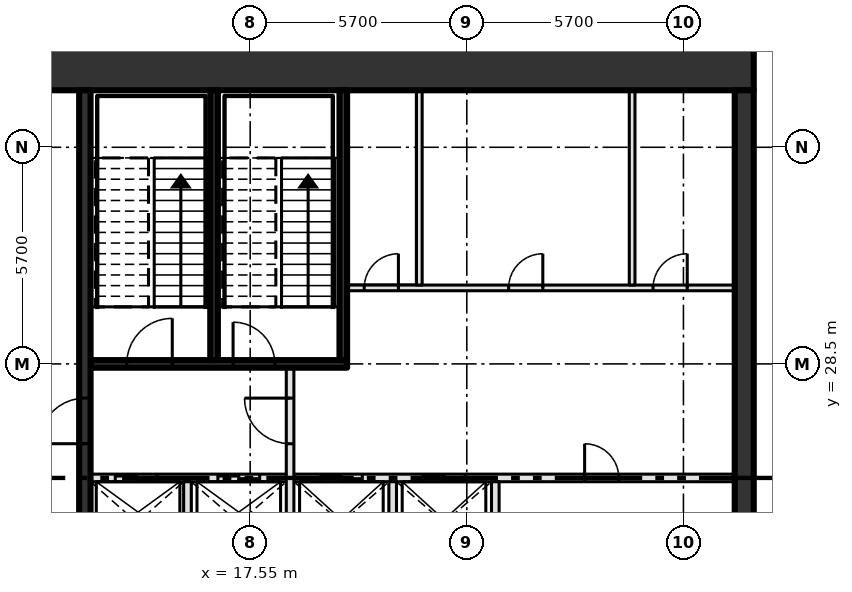
"""IFC4 building model, lengths in metres.
Left out: names, types, materials, properties, quantities, classifications, styles, units other than length and angle.
Written with IfcOpenShell. Run it as: python <this file> out.ifc"""

import sys

from ifc_helpers import new_model, si_unit, direction, frame, frame_2d, origin, place, context, subcontext, project, spatial, rectangle, extrude, element, fill, save


model = new_model("IFC4")
c1 = context("Model", 3, precision=1e-05, world=origin(), true_north=direction((0.0, 1.0)))
c2 = subcontext(c1, "Body", "Model", "MODEL_VIEW")
j1 = project(units=[si_unit("LENGTHUNIT", "METRE"), si_unit("PLANEANGLEUNIT", "RADIAN")], contexts=[c1])
p1 = place(None, origin())
s1 = spatial("IfcSite", under=j1, at=p1, CompositionType="ELEMENT")
p2 = place(p1, origin())
s2 = spatial("IfcBuilding", under=s1, at=p2, CompositionType="ELEMENT")
p3 = place(p2, frame((0.0, 0.0, 348.6)))
s3 = spatial("IfcBuildingStorey", under=s2, at=p3, CompositionType="ELEMENT", Elevation=348.6)
p4 = place(p3, frame((8.0, 36.3, -0.45), z_axis=(0.0, 0.0, 1.0), x_axis=(1.0, 0.0, 0.0)))
e1 = element("IfcWall", 1, at=p4, inside=s3, PredefinedType="SHEAR", context=c2, shape_type="SweptSolid", body=[
    extrude(rectangle(XDim=22.8, YDim=1.2, at=frame_2d((11.4, 0.0))), origin(), (0.0, 0.0, 1.0), 5.55),
])
p5 = place(p4, frame((2.3, 0.0, 0.45)))
e2 = element("IfcOpeningElement", 2, at=p5, cuts=e1, PredefinedType="OPENING", context=c2, shape_type="SweptSolid", body=[
    extrude(rectangle(XDim=1.8, YDim=2.1, at=frame_2d((0.9, 1.05))), frame((0.0, 0.61, 0.0), z_axis=(0.0, -1.0, 0.0), x_axis=(1.0, 0.0, 0.0)), (0.0, 0.0, 1.0), 1.22),
])
p6 = place(p3, frame((30.55, 14.6, -0.45), z_axis=(0.0, 0.0, 1.0), x_axis=(0.0, 1.0, 0.0)))
e3 = element("IfcWall", 3, at=p6, inside=s3, PredefinedType="SHEAR", context=c2, shape_type="SweptSolid", body=[
    extrude(rectangle(XDim=21.1, YDim=0.5, at=frame_2d((10.55, 0.0))), origin(), (0.0, 0.0, 1.0), 5.55),
])
p7 = place(p3, frame((13.35, 25.5, 0.0), z_axis=(0.0, 0.0, 1.0), x_axis=(1.0, 0.0, 0.0)))
e4 = element("IfcWall", 4, at=p7, inside=s3, PredefinedType="SOLIDWALL", context=c2, shape_type="SweptSolid", body=[
    extrude(rectangle(XDim=16.95, YDim=0.2, at=frame_2d((8.475, 0.0))), origin(), (0.0, 0.0, 1.0), 5.1),
])
p8 = place(p7, frame((0.65, 0.0, 0.0)))
e5 = element("IfcOpeningElement", 5, at=p8, cuts=e4, PredefinedType="OPENING", context=c2, shape_type="SweptSolid", body=[
    extrude(rectangle(XDim=1.1, YDim=2.1, at=frame_2d((0.55, 1.05))), frame((0.0, 0.11, 0.0), z_axis=(0.0, -1.0, 0.0), x_axis=(1.0, 0.0, 0.0)), (0.0, 0.0, 1.0), 0.22),
])
p9 = place(p7, frame((3.35, 0.0, 0.0)))
e6 = element("IfcOpeningElement", 6, at=p9, cuts=e4, PredefinedType="OPENING", context=c2, shape_type="SweptSolid", body=[
    extrude(rectangle(XDim=1.1, YDim=2.1, at=frame_2d((0.55, 1.05))), frame((0.0, 0.11, 0.0), z_axis=(0.0, -1.0, 0.0), x_axis=(1.0, 0.0, 0.0)), (0.0, 0.0, 1.0), 0.22),
])
p10 = place(p7, frame((6.05, 0.0, 0.0)))
e7 = element("IfcOpeningElement", 7, at=p10, cuts=e4, PredefinedType="OPENING", context=c2, shape_type="SweptSolid", body=[
    extrude(rectangle(XDim=1.1, YDim=2.1, at=frame_2d((0.55, 1.05))), frame((0.0, 0.11, 0.0), z_axis=(0.0, -1.0, 0.0), x_axis=(1.0, 0.0, 0.0)), (0.0, 0.0, 1.0), 0.22),
])
p11 = place(p7, frame((8.75, 0.0, 0.0)))
e8 = element("IfcOpeningElement", 8, at=p11, cuts=e4, PredefinedType="OPENING", context=c2, shape_type="SweptSolid", body=[
    extrude(rectangle(XDim=1.1, YDim=2.1, at=frame_2d((0.55, 1.05))), frame((0.0, 0.11, 0.0), z_axis=(0.0, -1.0, 0.0), x_axis=(1.0, 0.0, 0.0)), (0.0, 0.0, 1.0), 0.22),
])
p12 = place(p7, frame((13.0, 0.0, 0.0)))
e9 = element("IfcOpeningElement", 9, at=p12, cuts=e4, PredefinedType="OPENING", context=c2, shape_type="SweptSolid", body=[
    extrude(rectangle(XDim=0.9, YDim=2.1, at=frame_2d((0.45, 1.05))), frame((0.0, 0.11, 0.0), z_axis=(0.0, -1.0, 0.0), x_axis=(1.0, 0.0, 0.0)), (0.0, 0.0, 1.0), 0.22),
])
p13 = place(p3, frame((13.35, 28.5, 0.0), z_axis=(0.0, 0.0, 1.0), x_axis=(1.0, 0.0, 0.0)))
e10 = element("IfcWall", 10, at=p13, inside=s3, PredefinedType="SOLIDWALL", context=c2, shape_type="SweptSolid", body=[
    extrude(rectangle(XDim=6.75, YDim=0.2, at=frame_2d((3.375, 0.0))), origin(), (0.0, 0.0, 1.0), 5.1),
])
p14 = place(p13, frame((0.95, 0.0, 0.0)))
e11 = element("IfcOpeningElement", 11, at=p14, cuts=e10, PredefinedType="OPENING", context=c2, shape_type="SweptSolid", body=[
    extrude(rectangle(XDim=1.2, YDim=2.1, at=frame_2d((0.6, 1.05))), frame((0.0, 0.11, 0.0), z_axis=(0.0, -1.0, 0.0), x_axis=(1.0, 0.0, 0.0)), (0.0, 0.0, 1.0), 0.22),
])
p15 = place(p13, frame((3.75, 0.0, 0.0)))
e12 = element("IfcOpeningElement", 12, at=p15, cuts=e10, PredefinedType="OPENING", context=c2, shape_type="SweptSolid", body=[
    extrude(rectangle(XDim=1.1, YDim=2.1, at=frame_2d((0.55, 1.05))), frame((0.0, 0.11, 0.0), z_axis=(0.0, -1.0, 0.0), x_axis=(1.0, 0.0, 0.0)), (0.0, 0.0, 1.0), 0.22),
])
p16 = place(p3, frame((20.1, 30.5, 0.0), z_axis=(0.0, 0.0, 1.0), x_axis=(1.0, 0.0, 0.0)))
e13 = element("IfcWall", 13, at=p16, inside=s3, PredefinedType="PARTITIONING", context=c2, shape_type="SweptSolid", body=[
    extrude(rectangle(XDim=10.2, YDim=0.15, at=frame_2d((5.1, 0.0))), origin(), (0.0, 0.0, 1.0), 5.1),
])
p17 = place(p16, frame((0.45, 0.0, 0.0)))
e14 = element("IfcOpeningElement", 14, at=p17, cuts=e13, PredefinedType="OPENING", context=c2, shape_type="SweptSolid", body=[
    extrude(rectangle(XDim=0.9, YDim=2.1, at=frame_2d((0.45, 1.05))), frame((0.0, 0.085, 0.0), z_axis=(0.0, -1.0, 0.0), x_axis=(1.0, 0.0, 0.0)), (0.0, 0.0, 1.0), 0.17),
])
p18 = place(p16, frame((4.25, 0.0, 0.0)))
e15 = element("IfcOpeningElement", 15, at=p18, cuts=e13, PredefinedType="OPENING", context=c2, shape_type="SweptSolid", body=[
    extrude(rectangle(XDim=0.9, YDim=2.1, at=frame_2d((0.45, 1.05))), frame((0.0, 0.085, 0.0), z_axis=(0.0, -1.0, 0.0), x_axis=(1.0, 0.0, 0.0)), (0.0, 0.0, 1.0), 0.17),
])
p19 = place(p16, frame((8.05, 0.0, 0.0)))
e16 = element("IfcOpeningElement", 16, at=p19, cuts=e13, PredefinedType="OPENING", context=c2, shape_type="SweptSolid", body=[
    extrude(rectangle(XDim=0.9, YDim=2.1, at=frame_2d((0.45, 1.05))), frame((0.0, 0.085, 0.0), z_axis=(0.0, -1.0, 0.0), x_axis=(1.0, 0.0, 0.0)), (0.0, 0.0, 1.0), 0.17),
])
p20 = place(p3, frame((13.2, 14.6, 0.0), z_axis=(0.0, 0.0, 1.0), x_axis=(0.0, 1.0, 0.0)))
e17 = element("IfcWall", 17, at=p20, inside=s3, PredefinedType="SHEAR", context=c2, shape_type="SweptSolid", body=[
    extrude(rectangle(XDim=21.1, YDim=0.3, at=frame_2d((10.55, 0.0))), origin(), (0.0, 0.0, 1.0), 5.1),
])
p21 = place(p20, frame((3.7, 0.0, 0.0)))
e18 = element("IfcOpeningElement", 18, at=p21, cuts=e17, PredefinedType="OPENING", context=c2, shape_type="SweptSolid", body=[
    extrude(rectangle(XDim=1.8, YDim=2.1, at=frame_2d((0.9, 1.05))), frame((0.0, 0.16, 0.0), z_axis=(0.0, -1.0, 0.0), x_axis=(1.0, 0.0, 0.0)), (0.0, 0.0, 1.0), 0.32),
])
p22 = place(p20, frame((11.8, 0.0, 0.0)))
e19 = element("IfcOpeningElement", 19, at=p22, cuts=e17, PredefinedType="OPENING", context=c2, shape_type="SweptSolid", body=[
    extrude(rectangle(XDim=1.2, YDim=2.1, at=frame_2d((0.6, 1.05))), frame((0.0, 0.16, 0.0), z_axis=(0.0, -1.0, 0.0), x_axis=(1.0, 0.0, 0.0)), (0.0, 0.0, 1.0), 0.32),
])
p23 = place(p3, frame((15.9, 23.25, 0.0), z_axis=(0.0, 0.0, 1.0), x_axis=(0.0, 1.0, 0.0)))
e20 = element("IfcWall", 20, at=p23, inside=s3, PredefinedType="SOLIDWALL", context=c2, shape_type="SweptSolid", body=[
    extrude(rectangle(XDim=2.15, YDim=0.2, at=frame_2d((1.075, 0.0))), origin(), (0.0, 0.0, 1.0), 5.1),
])
p24 = place(p3, frame((16.6, 28.6, 0.0), z_axis=(0.0, 0.0, 1.0), x_axis=(0.0, 1.0, 0.0)))
e21 = element("IfcWall", 21, at=p24, inside=s3, PredefinedType="SOLIDWALL", context=c2, shape_type="SweptSolid", body=[
    extrude(rectangle(XDim=7.1, YDim=0.2, at=frame_2d((3.55, 0.0))), origin(), (0.0, 0.0, 1.0), 5.1),
])
p25 = place(p3, frame((18.6, 20.775, 0.0), z_axis=(0.0, 0.0, 1.0), x_axis=(0.0, 1.0, 0.0)))
e22 = element("IfcWall", 22, at=p25, inside=s3, PredefinedType="SOLIDWALL", context=c2, shape_type="SweptSolid", body=[
    extrude(rectangle(XDim=7.625, YDim=0.2, at=frame_2d((3.812, 0.0))), origin(), (0.0, 0.0, 1.0), 5.1),
])
p26 = place(p25, frame((5.625, 0.0, 0.0)))
e23 = element("IfcOpeningElement", 23, at=p26, cuts=e22, PredefinedType="OPENING", context=c2, shape_type="SweptSolid", body=[
    extrude(rectangle(XDim=1.2, YDim=2.1, at=frame_2d((0.6, 1.05))), frame((0.0, 0.11, 0.0), z_axis=(0.0, -1.0, 0.0), x_axis=(1.0, 0.0, 0.0)), (0.0, 0.0, 1.0), 0.22),
])
p27 = place(p3, frame((20.0, 28.6, 0.0), z_axis=(0.0, 0.0, 1.0), x_axis=(0.0, 1.0, 0.0)))
e24 = element("IfcWall", 24, at=p27, inside=s3, PredefinedType="SOLIDWALL", context=c2, shape_type="SweptSolid", body=[
    extrude(rectangle(XDim=7.1, YDim=0.2, at=frame_2d((3.55, 0.0))), origin(), (0.0, 0.0, 1.0), 5.1),
])
p28 = place(p3, frame((21.3, 23.25, 0.0), z_axis=(0.0, 0.0, 1.0), x_axis=(0.0, 1.0, 0.0)))
e25 = element("IfcWall", 25, at=p28, inside=s3, PredefinedType="SOLIDWALL", context=c2, shape_type="SweptSolid", body=[
    extrude(rectangle(XDim=2.15, YDim=0.2, at=frame_2d((1.075, 0.0))), origin(), (0.0, 0.0, 1.0), 5.1),
])
p29 = place(p3, frame((22.0, 30.575, 0.0), z_axis=(0.0, 0.0, 1.0), x_axis=(0.0, 1.0, 0.0)))
e26 = element("IfcWall", 26, at=p29, inside=s3, PredefinedType="PARTITIONING", context=c2, shape_type="SweptSolid", body=[
    extrude(rectangle(XDim=5.125, YDim=0.15, at=frame_2d((2.562, 0.0))), origin(), (0.0, 0.0, 1.0), 5.1),
])
p30 = place(p3, frame((24.0, 23.25, 0.0), z_axis=(0.0, 0.0, 1.0), x_axis=(0.0, 1.0, 0.0)))
e27 = element("IfcWall", 27, at=p30, inside=s3, PredefinedType="SOLIDWALL", context=c2, shape_type="SweptSolid", body=[
    extrude(rectangle(XDim=2.15, YDim=0.2, at=frame_2d((1.075, 0.0))), origin(), (0.0, 0.0, 1.0), 5.1),
])
p31 = place(p3, frame((27.6, 30.575, 0.0), z_axis=(0.0, 0.0, 1.0), x_axis=(0.0, 1.0, 0.0)))
e28 = element("IfcWall", 28, at=p31, inside=s3, PredefinedType="PARTITIONING", context=c2, shape_type="SweptSolid", body=[
    extrude(rectangle(XDim=5.125, YDim=0.15, at=frame_2d((2.562, 0.0))), origin(), (0.0, 0.0, 1.0), 5.1),
])
p32 = place(p3, frame((33.274, 36.794, 0.0), z_axis=(0.0, 0.0, 1.0), x_axis=(-0.707073323722, 0.707140237068, 0.0)))
e29 = element("IfcWall", 29, at=p32, inside=s3, PredefinedType="SOLIDWALL", context=c2, shape_type="SweptSolid", body=[
    extrude(rectangle(XDim=3.649, YDim=0.3, at=frame_2d((1.824, 0.0))), origin(), (0.0, 0.0, 1.0), 4.4),
])
p33 = place(p8, origin())
e30 = element("IfcDoor", 30, at=p33, inside=s3, OperationType="SLIDING_TO_LEFT", PredefinedType="DOOR", context=c2, shape_type="SweptSolid", body=[
    extrude(rectangle(XDim=1.1, YDim=2.1, at=frame_2d((0.55, 1.05))), frame((0.0, 0.025, 0.0), z_axis=(0.0, -1.0, 0.0), x_axis=(1.0, 0.0, 0.0)), (0.0, 0.0, 1.0), 0.05),
])
fill(e5, e30)
p34 = place(p9, origin())
e31 = element("IfcDoor", 31, at=p34, inside=s3, OperationType="SLIDING_TO_LEFT", PredefinedType="DOOR", context=c2, shape_type="SweptSolid", body=[
    extrude(rectangle(XDim=1.1, YDim=2.1, at=frame_2d((0.55, 1.05))), frame((0.0, 0.025, 0.0), z_axis=(0.0, -1.0, 0.0), x_axis=(1.0, 0.0, 0.0)), (0.0, 0.0, 1.0), 0.05),
])
fill(e6, e31)
p35 = place(p10, origin())
e32 = element("IfcDoor", 32, at=p35, inside=s3, OperationType="SLIDING_TO_LEFT", PredefinedType="DOOR", context=c2, shape_type="SweptSolid", body=[
    extrude(rectangle(XDim=1.1, YDim=2.1, at=frame_2d((0.55, 1.05))), frame((0.0, 0.025, 0.0), z_axis=(0.0, -1.0, 0.0), x_axis=(1.0, 0.0, 0.0)), (0.0, 0.0, 1.0), 0.05),
])
fill(e7, e32)
p36 = place(p11, origin())
e33 = element("IfcDoor", 33, at=p36, inside=s3, OperationType="SLIDING_TO_LEFT", PredefinedType="DOOR", context=c2, shape_type="SweptSolid", body=[
    extrude(rectangle(XDim=1.1, YDim=2.1, at=frame_2d((0.55, 1.05))), frame((0.0, 0.025, 0.0), z_axis=(0.0, -1.0, 0.0), x_axis=(1.0, 0.0, 0.0)), (0.0, 0.0, 1.0), 0.05),
])
fill(e8, e33)
p37 = place(p12, origin())
e34 = element("IfcDoor", 34, at=p37, inside=s3, OperationType="SINGLE_SWING_LEFT", PredefinedType="DOOR", context=c2, shape_type="SweptSolid", body=[
    extrude(rectangle(XDim=0.9, YDim=2.1, at=frame_2d((0.45, 1.05))), frame((0.0, 0.025, 0.0), z_axis=(0.0, -1.0, 0.0), x_axis=(1.0, 0.0, 0.0)), (0.0, 0.0, 1.0), 0.05),
])
fill(e9, e34)
p38 = place(p17, origin())
e35 = element("IfcDoor", 35, at=p38, inside=s3, OperationType="SINGLE_SWING_RIGHT", PredefinedType="DOOR", context=c2, shape_type="SweptSolid", body=[
    extrude(rectangle(XDim=0.9, YDim=2.1, at=frame_2d((0.45, 1.05))), frame((0.0, 0.025, 0.0), z_axis=(0.0, -1.0, 0.0), x_axis=(1.0, 0.0, 0.0)), (0.0, 0.0, 1.0), 0.05),
])
fill(e14, e35)
p39 = place(p18, origin())
e36 = element("IfcDoor", 36, at=p39, inside=s3, OperationType="SINGLE_SWING_RIGHT", PredefinedType="DOOR", context=c2, shape_type="SweptSolid", body=[
    extrude(rectangle(XDim=0.9, YDim=2.1, at=frame_2d((0.45, 1.05))), frame((0.0, 0.025, 0.0), z_axis=(0.0, -1.0, 0.0), x_axis=(1.0, 0.0, 0.0)), (0.0, 0.0, 1.0), 0.05),
])
fill(e15, e36)
p40 = place(p19, origin())
e37 = element("IfcDoor", 37, at=p40, inside=s3, OperationType="SINGLE_SWING_RIGHT", PredefinedType="DOOR", context=c2, shape_type="SweptSolid", body=[
    extrude(rectangle(XDim=0.9, YDim=2.1, at=frame_2d((0.45, 1.05))), frame((0.0, 0.025, 0.0), z_axis=(0.0, -1.0, 0.0), x_axis=(1.0, 0.0, 0.0)), (0.0, 0.0, 1.0), 0.05),
])
fill(e16, e37)
p41 = place(p14, origin())
e38 = element("IfcDoor", 38, at=p41, inside=s3, OperationType="SINGLE_SWING_RIGHT", PredefinedType="DOOR", context=c2, shape_type="SweptSolid", body=[
    extrude(rectangle(XDim=1.2, YDim=2.1, at=frame_2d((0.6, 1.05))), frame((0.0, 0.025, 0.0), z_axis=(0.0, -1.0, 0.0), x_axis=(1.0, 0.0, 0.0)), (0.0, 0.0, 1.0), 0.05),
])
fill(e11, e38)
p42 = place(p15, origin())
e39 = element("IfcDoor", 39, at=p42, inside=s3, OperationType="SINGLE_SWING_LEFT", PredefinedType="DOOR", context=c2, shape_type="SweptSolid", body=[
    extrude(rectangle(XDim=1.1, YDim=2.1, at=frame_2d((0.55, 1.05))), frame((0.0, 0.025, 0.0), z_axis=(0.0, -1.0, 0.0), x_axis=(1.0, 0.0, 0.0)), (0.0, 0.0, 1.0), 0.05),
])
fill(e12, e39)
p43 = place(p22, origin())
e40 = element("IfcDoor", 40, at=p43, inside=s3, OperationType="SINGLE_SWING_LEFT", PredefinedType="DOOR", context=c2, shape_type="SweptSolid", body=[
    extrude(rectangle(XDim=1.2, YDim=2.1, at=frame_2d((0.6, 1.05))), frame((0.0, 0.025, 0.0), z_axis=(0.0, -1.0, 0.0), x_axis=(1.0, 0.0, 0.0)), (0.0, 0.0, 1.0), 0.05),
])
fill(e19, e40)
p44 = place(p26, origin())
e41 = element("IfcDoor", 41, at=p44, inside=s3, OperationType="SINGLE_SWING_RIGHT", PredefinedType="DOOR", context=c2, shape_type="SweptSolid", body=[
    extrude(rectangle(XDim=1.2, YDim=2.1, at=frame_2d((0.6, 1.05))), frame((0.0, 0.025, 0.0), z_axis=(0.0, -1.0, 0.0), x_axis=(1.0, 0.0, 0.0)), (0.0, 0.0, 1.0), 0.05),
])
fill(e23, e41)
save(model, sys.argv[1])
